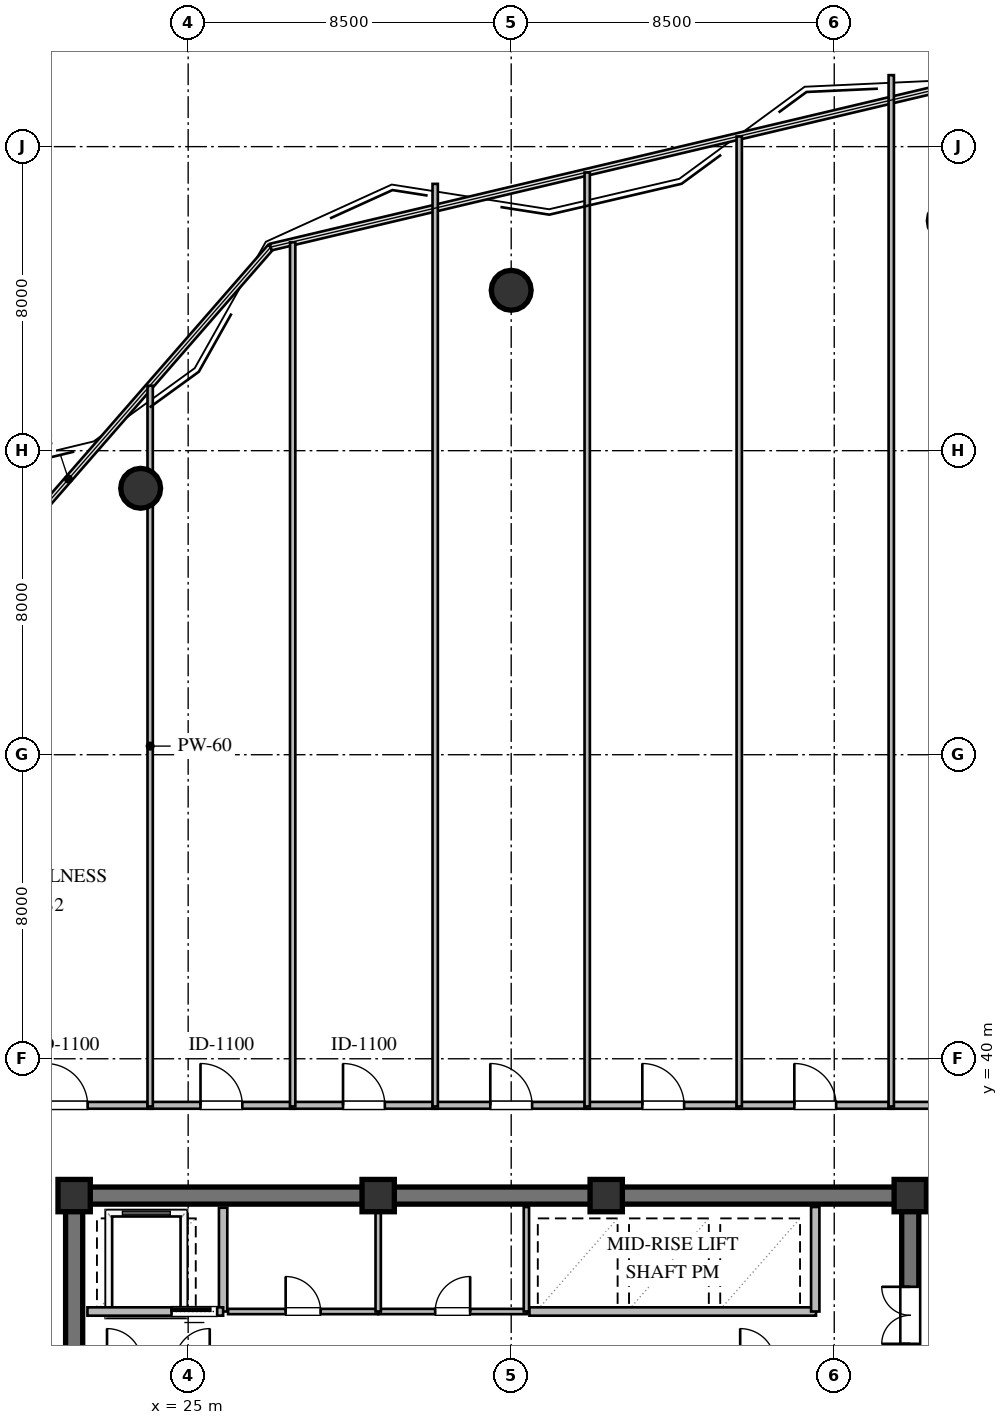
"""IFC4 building model, lengths in metres.
Left out: names, types, materials, properties, quantities, classifications, styles, units other than length and angle.
Written with IfcOpenShell. Run it as: python <this file> out.ifc"""

import sys

from ifc_helpers import new_model, si_unit, direction, frame, frame_2d, origin, origin_2d, place, context, subcontext, project, spatial, rectangle, circle, extrude, element, fill, save


model = new_model("IFC4")
c1 = context("Model", 3, precision=1e-05, world=origin(), true_north=direction((0.0, 1.0)))
c2 = subcontext(c1, "Body", "Model", "MODEL_VIEW")
j1 = project(units=[si_unit("LENGTHUNIT", "METRE"), si_unit("PLANEANGLEUNIT", "RADIAN")], contexts=[c1])
p1 = place(None, origin())
s1 = spatial("IfcSite", under=j1, at=p1, CompositionType="ELEMENT")
p2 = place(p1, origin())
s2 = spatial("IfcBuilding", under=s1, at=p2, CompositionType="ELEMENT")
p3 = place(p2, frame((0.0, 0.0, 195.6)))
s3 = spatial("IfcBuildingStorey", under=s2, at=p3, CompositionType="ELEMENT", Elevation=195.6)
p4 = place(p3, frame((21.775, 36.4, 0.0), z_axis=(0.0, 0.0, 1.0), x_axis=(1.0, 0.0, 0.0)))
e1 = element("IfcWall", 1, at=p4, inside=s3, PredefinedType="SHEAR", context=c2, shape_type="SweptSolid", body=[
    extrude(rectangle(XDim=22.45, YDim=0.45, at=frame_2d((11.225, 0.0))), origin(), (0.0, 0.0, 1.0), 3.36),
])
p5 = place(p3, frame((22.0, 23.825, 0.0), z_axis=(0.0, 0.0, 1.0), x_axis=(0.0, 1.0, 0.0)))
e2 = element("IfcWall", 2, at=p5, inside=s3, PredefinedType="SHEAR", context=c2, shape_type="SweptSolid", body=[
    extrude(rectangle(XDim=12.35, YDim=0.45, at=frame_2d((6.175, 0.0))), origin(), (0.0, 0.0, 1.0), 3.36),
])
p6 = place(p3, frame((44.0, 23.825, 0.0), z_axis=(0.0, 0.0, 1.0), x_axis=(0.0, 1.0, 0.0)))
e3 = element("IfcWall", 3, at=p6, inside=s3, PredefinedType="SHEAR", context=c2, shape_type="SweptSolid", body=[
    extrude(rectangle(XDim=12.35, YDim=0.45, at=frame_2d((6.175, 0.0))), origin(), (0.0, 0.0, 1.0), 3.36),
])
p7 = place(p6, frame((8.675, 0.0, 0.0)))
e4 = element("IfcOpeningElement", 4, at=p7, cuts=e3, PredefinedType="OPENING", context=c2, shape_type="SweptSolid", body=[
    extrude(rectangle(XDim=1.5, YDim=2.15, at=frame_2d((0.75, 1.075))), frame((0.0, 0.235, 0.0), z_axis=(0.0, -1.0, 0.0), x_axis=(1.0, 0.0, 0.0)), (0.0, 0.0, 1.0), 0.47),
])
for number, where, z_axis, x_axis in (
    (5, (44.0, 36.4, 0.0), (0.0, 0.0, 1.0), (1.0, 0.0, 0.0)),
    (6, (36.0, 36.4, 0.0), (0.0, 0.0, 1.0), (1.0, 0.0, 0.0)),
    (7, (30.0, 36.4, 0.0), (0.0, 0.0, 1.0), (1.0, 0.0, 0.0)),
    (8, (22.0, 36.4, 0.0), (0.0, 0.0, 1.0), (1.0, 0.0, 0.0)),
):
    element("IfcColumn", number, at=place(p3, frame(where, z_axis=z_axis, x_axis=x_axis)), inside=s3, PredefinedType="COLUMN", context=c2, shape_type="SweptSolid", body=[
        extrude(rectangle(XDim=0.85, YDim=0.85, at=origin_2d()), origin(), (0.0, 0.0, 1.0), 3.6),
    ])
for number, where, z_axis, x_axis in (
    (9, (33.5, 60.22, 0.0), (0.0, 0.0, 1.0), (1.0, 0.0, 0.0)),
    (10, (23.75, 55.01, 0.0), (0.0, 0.0, 1.0), (1.0, 0.0, 0.0)),
):
    element("IfcColumn", number, at=place(p3, frame(where, z_axis=z_axis, x_axis=x_axis)), inside=s3, PredefinedType="COLUMN", context=c2, shape_type="SweptSolid", body=[
        extrude(circle(Radius=0.525, at=origin_2d()), origin(), (0.0, 0.0, 1.0), 3.6),
    ])
p8 = place(p3, frame((25.92, 33.35, 0.0), z_axis=(0.0, 0.0, 1.0), x_axis=(0.0, 1.0, 0.0)))
e11 = element("IfcWall", 11, at=p8, inside=s3, PredefinedType="SOLIDWALL", context=c2, shape_type="SweptSolid", body=[
    extrude(rectangle(XDim=2.73, YDim=0.22, at=frame_2d((1.365, 0.0))), origin(), (0.0, 0.0, 1.0), 3.36),
])
p9 = place(p3, frame((22.35, 33.35, 0.0), z_axis=(0.0, 0.0, 1.0), x_axis=(1.0, 0.0, 0.0)))
e12 = element("IfcWall", 12, at=p9, inside=s3, PredefinedType="SOLIDWALL", context=c2, shape_type="SweptSolid", body=[
    extrude(rectangle(XDim=3.57, YDim=0.22, at=frame_2d((1.785, 0.0))), origin(), (0.0, 0.0, 1.0), 3.36),
])
p10 = place(p9, frame((2.213, 0.0, 0.0)))
e13 = element("IfcOpeningElement", 13, at=p10, cuts=e12, PredefinedType="OPENING", context=c2, shape_type="SweptSolid", body=[
    extrude(rectangle(XDim=1.2, YDim=2.1, at=frame_2d((0.6, 1.05))), frame((0.0, 0.12, 0.0), z_axis=(0.0, -1.0, 0.0), x_axis=(1.0, 0.0, 0.0)), (0.0, 0.0, 1.0), 0.24),
])
p11 = place(p3, frame((26.05, 33.35, 0.0), z_axis=(0.0, 0.0, 1.0), x_axis=(1.0, 0.0, 0.0)))
e14 = element("IfcWall", 14, at=p11, inside=s3, PredefinedType="PARTITIONING", context=c2, shape_type="SweptSolid", body=[
    extrude(rectangle(XDim=3.95, YDim=0.14, at=frame_2d((1.975, 0.0))), origin(), (0.0, 0.0, 1.0), 3.36),
])
p12 = place(p11, frame((1.515, 0.0, 0.0)))
e15 = element("IfcOpeningElement", 15, at=p12, cuts=e14, PredefinedType="OPENING", context=c2, shape_type="SweptSolid", body=[
    extrude(rectangle(XDim=0.92, YDim=2.1, at=frame_2d((0.46, 1.05))), frame((0.0, 0.08, 0.0), z_axis=(0.0, -1.0, 0.0), x_axis=(1.0, 0.0, 0.0)), (0.0, 0.0, 1.0), 0.16),
])
p13 = place(p3, frame((30.0, 33.35, 0.0), z_axis=(0.0, 0.0, 1.0), x_axis=(1.0, 0.0, 0.0)))
e16 = element("IfcWall", 16, at=p13, inside=s3, PredefinedType="PARTITIONING", context=c2, shape_type="SweptSolid", body=[
    extrude(rectangle(XDim=3.92, YDim=0.14, at=frame_2d((1.96, 0.0))), origin(), (0.0, 0.0, 1.0), 3.36),
])
p14 = place(p13, frame((1.5, 0.0, 0.0)))
e17 = element("IfcOpeningElement", 17, at=p14, cuts=e16, PredefinedType="OPENING", context=c2, shape_type="SweptSolid", body=[
    extrude(rectangle(XDim=0.92, YDim=2.1, at=frame_2d((0.46, 1.05))), frame((0.0, 0.08, 0.0), z_axis=(0.0, -1.0, 0.0), x_axis=(1.0, 0.0, 0.0)), (0.0, 0.0, 1.0), 0.16),
])
for number, where, z_axis, x_axis in (
    (18, (30.0, 33.35, 0.0), (0.0, 0.0, 1.0), (0.0, 1.0, 0.0)),
    (19, (33.9, 33.35, 0.0), (0.0, 0.0, 1.0), (0.0, 1.0, 0.0)),
):
    element("IfcWall", number, at=place(p3, frame(where, z_axis=z_axis, x_axis=x_axis)), inside=s3, PredefinedType="PARTITIONING", context=c2, shape_type="SweptSolid", body=[
        extrude(rectangle(XDim=2.75, YDim=0.14, at=frame_2d((1.375, 0.0))), origin(), (0.0, 0.0, 1.0), 3.36),
    ])
p15 = place(p3, frame((33.98, 33.35, 0.0), z_axis=(0.0, 0.0, 1.0), x_axis=(1.0, 0.0, 0.0)))
e20 = element("IfcWall", 20, at=p15, inside=s3, PredefinedType="SOLIDWALL", context=c2, shape_type="SweptSolid", body=[
    extrude(rectangle(XDim=7.54, YDim=0.22, at=frame_2d((3.77, 0.0))), origin(), (0.0, 0.0, 1.0), 3.36),
])
p16 = place(p3, frame((41.5, 33.35, 0.0), z_axis=(0.0, 0.0, 1.0), x_axis=(0.0, 1.0, 0.0)))
e21 = element("IfcWall", 21, at=p16, inside=s3, PredefinedType="SOLIDWALL", context=c2, shape_type="SweptSolid", body=[
    extrude(rectangle(XDim=2.75, YDim=0.22, at=frame_2d((1.375, 0.0))), origin(), (0.0, 0.0, 1.0), 3.36),
])
p17 = place(p3, frame((19.545, 38.775, 0.0), z_axis=(0.0, 0.0, 1.0), x_axis=(1.0, 0.0, 0.0)))
e22 = element("IfcWall", 22, at=p17, inside=s3, PredefinedType="PARTITIONING", context=c2, shape_type="SweptSolid", body=[
    extrude(rectangle(XDim=4.52, YDim=0.18, at=frame_2d((2.26, 0.0))), origin(), (0.0, 0.0, 1.0), 3.36),
])
p18 = place(p17, frame((1.71, 0.0, 0.0)))
e23 = element("IfcOpeningElement", 23, at=p18, cuts=e22, PredefinedType="OPENING", context=c2, shape_type="SweptSolid", body=[
    extrude(rectangle(XDim=1.1, YDim=2.1, at=frame_2d((0.55, 1.05))), frame((0.0, 0.1, 0.0), z_axis=(0.0, -1.0, 0.0), x_axis=(1.0, 0.0, 0.0)), (0.0, 0.0, 1.0), 0.2),
])
p19 = place(p3, frame((23.935, 38.775, 0.0), z_axis=(0.0, 0.0, 1.0), x_axis=(1.0, 0.0, 0.0)))
e24 = element("IfcWall", 24, at=p19, inside=s3, PredefinedType="PARTITIONING", context=c2, shape_type="SweptSolid", body=[
    extrude(rectangle(XDim=3.88, YDim=0.18, at=frame_2d((1.94, 0.0))), origin(), (0.0, 0.0, 1.0), 3.36),
])
p20 = place(p19, frame((1.39, 0.0, 0.0)))
e25 = element("IfcOpeningElement", 25, at=p20, cuts=e24, PredefinedType="OPENING", context=c2, shape_type="SweptSolid", body=[
    extrude(rectangle(XDim=1.1, YDim=2.1, at=frame_2d((0.55, 1.05))), frame((0.0, 0.1, 0.0), z_axis=(0.0, -1.0, 0.0), x_axis=(1.0, 0.0, 0.0)), (0.0, 0.0, 1.0), 0.2),
])
p21 = place(p3, frame((27.685, 38.775, 0.0), z_axis=(0.0, 0.0, 1.0), x_axis=(1.0, 0.0, 0.0)))
e26 = element("IfcWall", 26, at=p21, inside=s3, PredefinedType="PARTITIONING", context=c2, shape_type="SweptSolid", body=[
    extrude(rectangle(XDim=3.88, YDim=0.18, at=frame_2d((1.94, 0.0))), origin(), (0.0, 0.0, 1.0), 3.36),
])
p22 = place(p21, frame((1.39, 0.0, 0.0)))
e27 = element("IfcOpeningElement", 27, at=p22, cuts=e26, PredefinedType="OPENING", context=c2, shape_type="SweptSolid", body=[
    extrude(rectangle(XDim=1.1, YDim=2.1, at=frame_2d((0.55, 1.05))), frame((0.0, 0.1, 0.0), z_axis=(0.0, -1.0, 0.0), x_axis=(1.0, 0.0, 0.0)), (0.0, 0.0, 1.0), 0.2),
])
p23 = place(p3, frame((31.435, 38.775, 0.0), z_axis=(0.0, 0.0, 1.0), x_axis=(1.0, 0.0, 0.0)))
e28 = element("IfcWall", 28, at=p23, inside=s3, PredefinedType="PARTITIONING", context=c2, shape_type="SweptSolid", body=[
    extrude(rectangle(XDim=4.13, YDim=0.18, at=frame_2d((2.065, 0.0))), origin(), (0.0, 0.0, 1.0), 3.36),
])
p24 = place(p23, frame((1.515, 0.0, 0.0)))
e29 = element("IfcOpeningElement", 29, at=p24, cuts=e28, PredefinedType="OPENING", context=c2, shape_type="SweptSolid", body=[
    extrude(rectangle(XDim=1.1, YDim=2.1, at=frame_2d((0.55, 1.05))), frame((0.0, 0.1, 0.0), z_axis=(0.0, -1.0, 0.0), x_axis=(1.0, 0.0, 0.0)), (0.0, 0.0, 1.0), 0.2),
])
p25 = place(p3, frame((35.435, 38.775, 0.0), z_axis=(0.0, 0.0, 1.0), x_axis=(1.0, 0.0, 0.0)))
e30 = element("IfcWall", 30, at=p25, inside=s3, PredefinedType="PARTITIONING", context=c2, shape_type="SweptSolid", body=[
    extrude(rectangle(XDim=4.13, YDim=0.18, at=frame_2d((2.065, 0.0))), origin(), (0.0, 0.0, 1.0), 3.36),
])
p26 = place(p25, frame((1.515, 0.0, 0.0)))
e31 = element("IfcOpeningElement", 31, at=p26, cuts=e30, PredefinedType="OPENING", context=c2, shape_type="SweptSolid", body=[
    extrude(rectangle(XDim=1.1, YDim=2.1, at=frame_2d((0.55, 1.05))), frame((0.0, 0.1, 0.0), z_axis=(0.0, -1.0, 0.0), x_axis=(1.0, 0.0, 0.0)), (0.0, 0.0, 1.0), 0.2),
])
p27 = place(p3, frame((39.435, 38.775, 0.0), z_axis=(0.0, 0.0, 1.0), x_axis=(1.0, 0.0, 0.0)))
e32 = element("IfcWall", 32, at=p27, inside=s3, PredefinedType="PARTITIONING", context=c2, shape_type="SweptSolid", body=[
    extrude(rectangle(XDim=4.13, YDim=0.18, at=frame_2d((2.065, 0.0))), origin(), (0.0, 0.0, 1.0), 3.36),
])
p28 = place(p27, frame((1.515, 0.0, 0.0)))
e33 = element("IfcOpeningElement", 33, at=p28, cuts=e32, PredefinedType="OPENING", context=c2, shape_type="SweptSolid", body=[
    extrude(rectangle(XDim=1.1, YDim=2.1, at=frame_2d((0.55, 1.05))), frame((0.0, 0.1, 0.0), z_axis=(0.0, -1.0, 0.0), x_axis=(1.0, 0.0, 0.0)), (0.0, 0.0, 1.0), 0.2),
])
p29 = place(p3, frame((43.435, 38.775, 0.0), z_axis=(0.0, 0.0, 1.0), x_axis=(1.0, 0.0, 0.0)))
e34 = element("IfcWall", 34, at=p29, inside=s3, PredefinedType="PARTITIONING", context=c2, shape_type="SweptSolid", body=[
    extrude(rectangle(XDim=4.13, YDim=0.18, at=frame_2d((2.065, 0.0))), origin(), (0.0, 0.0, 1.0), 3.36),
])
p30 = place(p29, frame((1.515, 0.0, 0.0)))
e35 = element("IfcOpeningElement", 35, at=p30, cuts=e34, PredefinedType="OPENING", context=c2, shape_type="SweptSolid", body=[
    extrude(rectangle(XDim=1.1, YDim=2.1, at=frame_2d((0.55, 1.05))), frame((0.0, 0.1, 0.0), z_axis=(0.0, -1.0, 0.0), x_axis=(1.0, 0.0, 0.0)), (0.0, 0.0, 1.0), 0.2),
])
p31 = place(p3, frame((24.0, 57.709, 0.0), z_axis=(0.0, 0.0, 1.0), x_axis=(0.0, -1.0, 0.0)))
e36 = element("IfcWall", 36, at=p31, inside=s3, PredefinedType="PARTITIONING", context=c2, shape_type="SweptSolid", body=[
    extrude(rectangle(XDim=18.964, YDim=0.14, at=frame_2d((9.482, 0.0))), origin(), (0.0, 0.0, 1.0), 2.89),
])
p32 = place(p3, frame((27.75, 61.484, 0.0), z_axis=(0.0, 0.0, 1.0), x_axis=(0.0, -1.0, 0.0)))
e37 = element("IfcWall", 37, at=p32, inside=s3, PredefinedType="PARTITIONING", context=c2, shape_type="SweptSolid", body=[
    extrude(rectangle(XDim=22.739, YDim=0.14, at=frame_2d((11.369, 0.0))), origin(), (0.0, 0.0, 1.0), 3.36),
])
p33 = place(p3, frame((31.5, 63.02, 0.0), z_axis=(0.0, 0.0, 1.0), x_axis=(0.0, -1.0, 0.0)))
e38 = element("IfcWall", 38, at=p33, inside=s3, PredefinedType="PARTITIONING", context=c2, shape_type="SweptSolid", body=[
    extrude(rectangle(XDim=24.275, YDim=0.14, at=frame_2d((12.137, 0.0))), origin(), (0.0, 0.0, 1.0), 3.36),
])
p34 = place(p3, frame((35.5, 63.319, 0.0), z_axis=(0.0, 0.0, 1.0), x_axis=(0.0, -1.0, 0.0)))
e39 = element("IfcWall", 39, at=p34, inside=s3, PredefinedType="PARTITIONING", context=c2, shape_type="SweptSolid", body=[
    extrude(rectangle(XDim=24.574, YDim=0.14, at=frame_2d((12.287, 0.0))), origin(), (0.0, 0.0, 1.0), 2.89),
])
p35 = place(p3, frame((39.5, 64.266, 0.0), z_axis=(0.0, 0.0, 1.0), x_axis=(0.0, -1.0, 0.0)))
e40 = element("IfcWall", 40, at=p35, inside=s3, PredefinedType="PARTITIONING", context=c2, shape_type="SweptSolid", body=[
    extrude(rectangle(XDim=25.521, YDim=0.14, at=frame_2d((12.761, 0.0))), origin(), (0.0, 0.0, 1.0), 3.36),
])
p36 = place(p3, frame((43.5, 65.881, 0.0), z_axis=(0.0, 0.0, 1.0), x_axis=(0.0, -1.0, 0.0)))
e41 = element("IfcWall", 41, at=p36, inside=s3, PredefinedType="PARTITIONING", context=c2, shape_type="SweptSolid", body=[
    extrude(rectangle(XDim=27.136, YDim=0.14, at=frame_2d((13.568, 0.0))), origin(), (0.0, 0.0, 1.0), 2.89),
])
p37 = place(p7, origin())
e42 = element("IfcDoor", 42, at=p37, inside=s3, OperationType="DOUBLE_DOOR_SINGLE_SWING", PredefinedType="DOOR", context=c2, shape_type="SweptSolid", body=[
    extrude(rectangle(XDim=1.5, YDim=2.15, at=frame_2d((0.75, 1.075))), frame((0.0, 0.025, 0.0), z_axis=(0.0, -1.0, 0.0), x_axis=(1.0, 0.0, 0.0)), (0.0, 0.0, 1.0), 0.05),
])
fill(e4, e42)
p38 = place(p10, origin())
e43 = element("IfcDoor", 43, at=p38, inside=s3, OperationType="SLIDING_TO_LEFT", PredefinedType="DOOR", context=c2, shape_type="SweptSolid", body=[
    extrude(rectangle(XDim=1.2, YDim=2.1, at=frame_2d((0.6, 1.05))), frame((0.0, 0.025, 0.0), z_axis=(0.0, -1.0, 0.0), x_axis=(1.0, 0.0, 0.0)), (0.0, 0.0, 1.0), 0.05),
])
fill(e13, e43)
p39 = place(p12, origin())
e44 = element("IfcDoor", 44, at=p39, inside=s3, OperationType="SINGLE_SWING_LEFT", PredefinedType="DOOR", context=c2, shape_type="SweptSolid", body=[
    extrude(rectangle(XDim=0.92, YDim=2.1, at=frame_2d((0.46, 1.05))), frame((0.0, 0.025, 0.0), z_axis=(0.0, -1.0, 0.0), x_axis=(1.0, 0.0, 0.0)), (0.0, 0.0, 1.0), 0.05),
])
fill(e15, e44)
p40 = place(p14, origin())
e45 = element("IfcDoor", 45, at=p40, inside=s3, OperationType="SINGLE_SWING_RIGHT", PredefinedType="DOOR", context=c2, shape_type="SweptSolid", body=[
    extrude(rectangle(XDim=0.92, YDim=2.1, at=frame_2d((0.46, 1.05))), frame((0.0, 0.025, 0.0), z_axis=(0.0, -1.0, 0.0), x_axis=(1.0, 0.0, 0.0)), (0.0, 0.0, 1.0), 0.05),
])
fill(e17, e45)
p41 = place(p18, origin())
e46 = element("IfcDoor", 46, at=p41, inside=s3, OperationType="SINGLE_SWING_LEFT", PredefinedType="DOOR", context=c2, shape_type="SweptSolid", body=[
    extrude(rectangle(XDim=1.1, YDim=2.1, at=frame_2d((0.55, 1.05))), frame((0.0, 0.025, 0.0), z_axis=(0.0, -1.0, 0.0), x_axis=(1.0, 0.0, 0.0)), (0.0, 0.0, 1.0), 0.05),
])
fill(e23, e46)
p42 = place(p20, origin())
e47 = element("IfcDoor", 47, at=p42, inside=s3, OperationType="SINGLE_SWING_LEFT", PredefinedType="DOOR", context=c2, shape_type="SweptSolid", body=[
    extrude(rectangle(XDim=1.1, YDim=2.1, at=frame_2d((0.55, 1.05))), frame((0.0, 0.025, 0.0), z_axis=(0.0, -1.0, 0.0), x_axis=(1.0, 0.0, 0.0)), (0.0, 0.0, 1.0), 0.05),
])
fill(e25, e47)
p43 = place(p22, origin())
e48 = element("IfcDoor", 48, at=p43, inside=s3, OperationType="SINGLE_SWING_LEFT", PredefinedType="DOOR", context=c2, shape_type="SweptSolid", body=[
    extrude(rectangle(XDim=1.1, YDim=2.1, at=frame_2d((0.55, 1.05))), frame((0.0, 0.025, 0.0), z_axis=(0.0, -1.0, 0.0), x_axis=(1.0, 0.0, 0.0)), (0.0, 0.0, 1.0), 0.05),
])
fill(e27, e48)
p44 = place(p24, origin())
e49 = element("IfcDoor", 49, at=p44, inside=s3, OperationType="SINGLE_SWING_LEFT", PredefinedType="DOOR", context=c2, shape_type="SweptSolid", body=[
    extrude(rectangle(XDim=1.1, YDim=2.1, at=frame_2d((0.55, 1.05))), frame((0.0, 0.025, 0.0), z_axis=(0.0, -1.0, 0.0), x_axis=(1.0, 0.0, 0.0)), (0.0, 0.0, 1.0), 0.05),
])
fill(e29, e49)
p45 = place(p26, origin())
e50 = element("IfcDoor", 50, at=p45, inside=s3, OperationType="SINGLE_SWING_LEFT", PredefinedType="DOOR", context=c2, shape_type="SweptSolid", body=[
    extrude(rectangle(XDim=1.1, YDim=2.1, at=frame_2d((0.55, 1.05))), frame((0.0, 0.025, 0.0), z_axis=(0.0, -1.0, 0.0), x_axis=(1.0, 0.0, 0.0)), (0.0, 0.0, 1.0), 0.05),
])
fill(e31, e50)
p46 = place(p28, origin())
e51 = element("IfcDoor", 51, at=p46, inside=s3, OperationType="SINGLE_SWING_LEFT", PredefinedType="DOOR", context=c2, shape_type="SweptSolid", body=[
    extrude(rectangle(XDim=1.1, YDim=2.1, at=frame_2d((0.55, 1.05))), frame((0.0, 0.025, 0.0), z_axis=(0.0, -1.0, 0.0), x_axis=(1.0, 0.0, 0.0)), (0.0, 0.0, 1.0), 0.05),
])
fill(e33, e51)
save(model, sys.argv[1])
